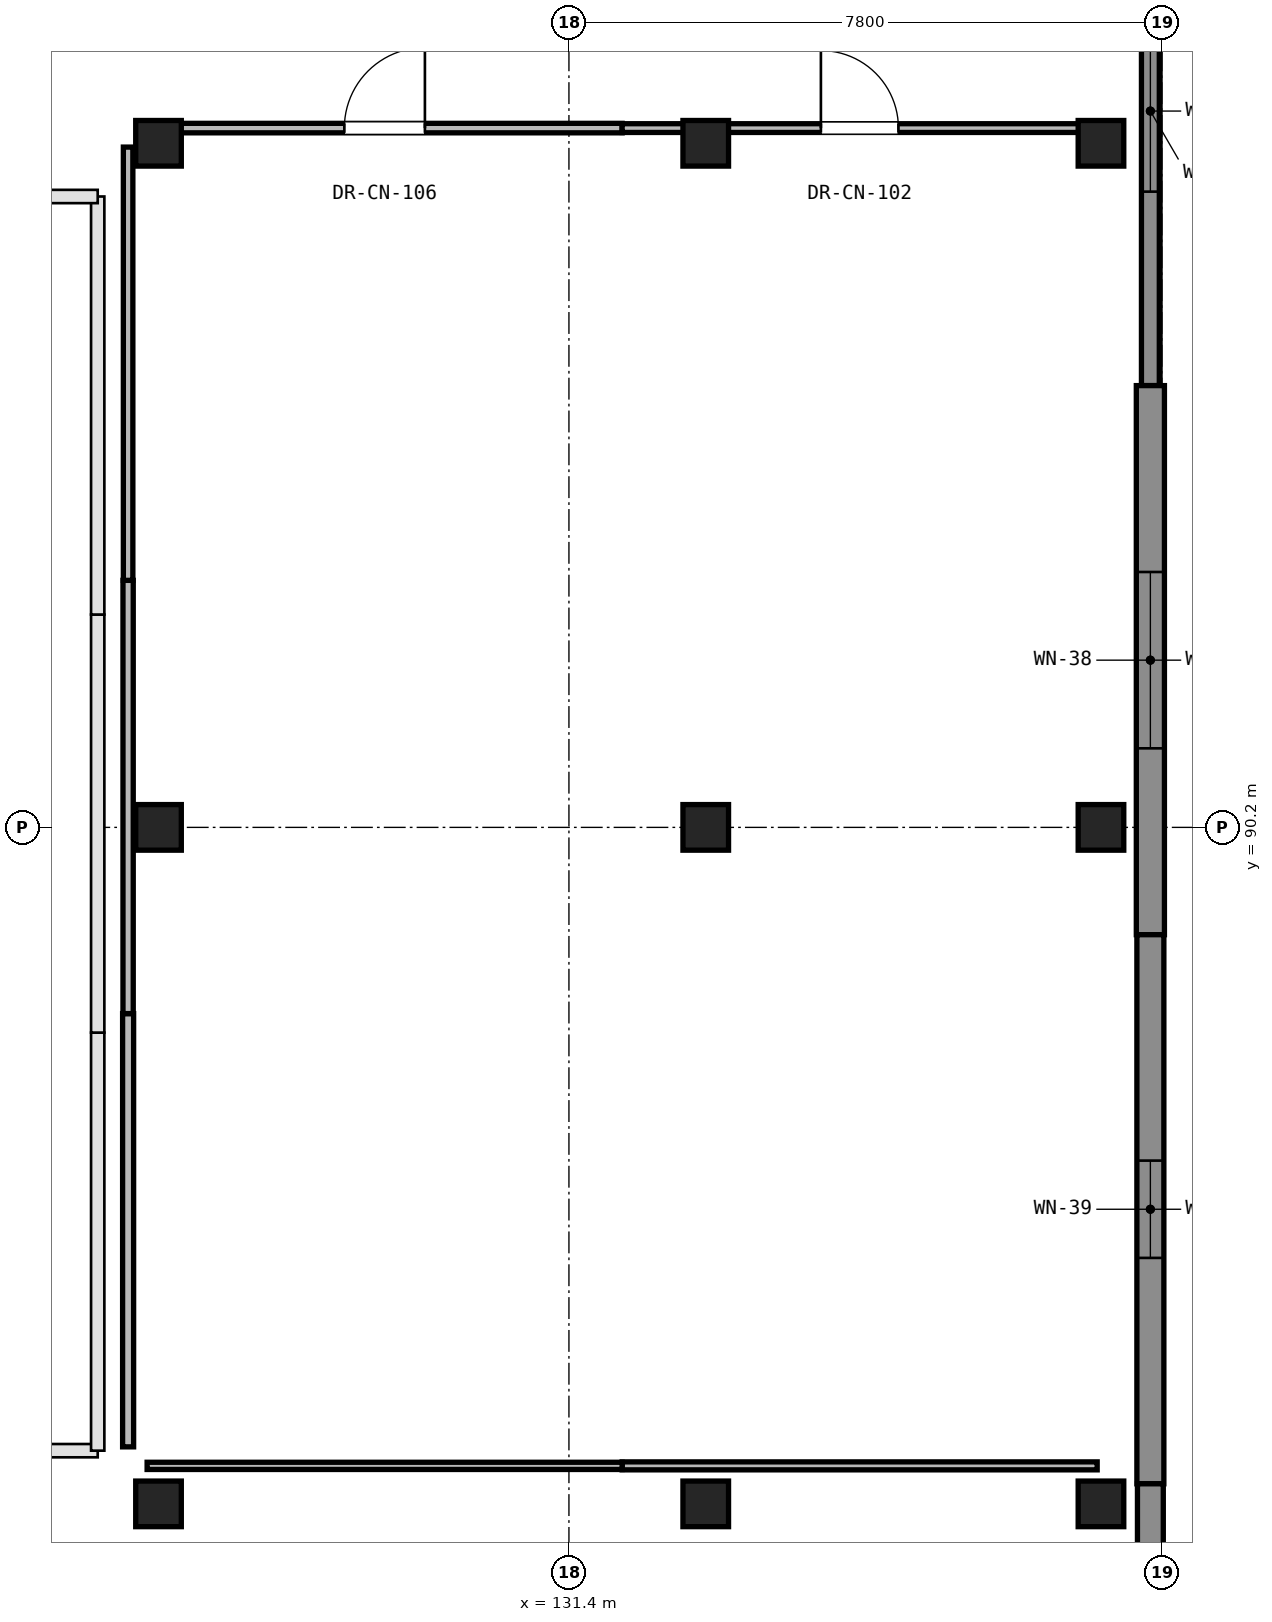
"""IFC4 building model, lengths in metres.
Left out: names, types, materials, properties, quantities, classifications, styles, units other than length and angle.
Written with IfcOpenShell. Run it as: python <this file> out.ifc"""

import sys

from ifc_helpers import new_model, si_unit, direction, frame, frame_2d, origin, origin_2d, place, context, subcontext, project, spatial, rectangle, extrude, element, fill, save


model = new_model("IFC4")
c1 = context("Model", 3, precision=1e-05, world=origin(), true_north=direction((0.0, 1.0)))
c2 = subcontext(c1, "Body", "Model", "MODEL_VIEW")
j1 = project(units=[si_unit("LENGTHUNIT", "METRE"), si_unit("PLANEANGLEUNIT", "RADIAN")], contexts=[c1])
p1 = place(None, origin())
s1 = spatial("IfcSite", under=j1, at=p1, CompositionType="ELEMENT")
p2 = place(p1, origin())
s2 = spatial("IfcBuilding", under=s1, at=p2, CompositionType="ELEMENT")
p3 = place(p2, origin())
s3 = spatial("IfcBuildingStorey", under=s2, at=p3, CompositionType="ELEMENT", Elevation=0.0)
for number, where, z_axis, x_axis in (
    (1, (126.0, 81.3, 0.0), (0.0, 0.0, 1.0), (1.0, 0.0, 0.0)),
    (2, (126.0, 90.2, 0.0), (0.0, 0.0, 1.0), (1.0, 0.0, 0.0)),
    (3, (126.0, 99.2, 0.0), (0.0, 0.0, 1.0), (1.0, 0.0, 0.0)),
    (4, (133.2, 81.3, 0.0), (0.0, 0.0, 1.0), (1.0, 0.0, 0.0)),
    (5, (133.2, 90.2, 0.0), (0.0, 0.0, 1.0), (1.0, 0.0, 0.0)),
    (6, (133.2, 99.2, 0.0), (0.0, 0.0, 1.0), (1.0, 0.0, 0.0)),
    (7, (138.4, 81.3, 0.0), (0.0, 0.0, 1.0), (1.0, 0.0, 0.0)),
    (8, (138.4, 90.2, 0.0), (0.0, 0.0, 1.0), (1.0, 0.0, 0.0)),
    (9, (138.4, 99.2, 0.0), (0.0, 0.0, 1.0), (1.0, 0.0, 0.0)),
):
    element("IfcColumn", number, at=place(p3, frame(where, z_axis=z_axis, x_axis=x_axis)), inside=s3, PredefinedType="COLUMN", context=c2, shape_type="SweptSolid", body=[
        extrude(rectangle(XDim=0.6, YDim=0.6, at=origin_2d()), origin(), (0.0, 0.0, 1.0), 5.1),
    ])
p4 = place(p3, frame((139.05, 103.236, 0.0), z_axis=(0.0, 0.0, 1.0), x_axis=(0.0, -1.0, 0.0)))
e10 = element("IfcWall", 10, at=p4, inside=s3, PredefinedType="SOLIDWALL", context=c2, shape_type="SweptSolid", body=[
    extrude(rectangle(XDim=7.224, YDim=0.235, at=frame_2d((3.612, 0.0))), origin(), (0.0, 0.0, 1.0), 4.81),
])
p5 = place(p4, frame((2.552, 0.0, 0.9)))
e11 = element("IfcOpeningElement", 11, at=p5, cuts=e10, PredefinedType="OPENING", context=c2, shape_type="SweptSolid", body=[
    extrude(rectangle(XDim=2.12, YDim=1.62, at=frame_2d((1.06, 0.81))), frame((0.0, 0.127, 0.0), z_axis=(0.0, -1.0, 0.0), x_axis=(1.0, 0.0, 0.0)), (0.0, 0.0, 1.0), 0.255),
])
p6 = place(p3, frame((139.05, 96.012, 0.0), z_axis=(0.0, 0.0, 1.0), x_axis=(0.0, -1.0, 0.0)))
e12 = element("IfcWall", 12, at=p6, inside=s3, PredefinedType="SOLIDWALL", context=c2, shape_type="SweptSolid", body=[
    extrude(rectangle(XDim=7.224, YDim=0.37, at=frame_2d((3.612, 0.0))), origin(), (0.0, 0.0, 1.0), 4.81),
])
p7 = place(p6, frame((2.452, 0.0, 0.9)))
e13 = element("IfcOpeningElement", 13, at=p7, cuts=e12, PredefinedType="OPENING", context=c2, shape_type="SweptSolid", body=[
    extrude(rectangle(XDim=2.32, YDim=1.62, at=frame_2d((1.16, 0.81))), frame((0.0, 0.195, 0.0), z_axis=(0.0, -1.0, 0.0), x_axis=(1.0, 0.0, 0.0)), (0.0, 0.0, 1.0), 0.39),
])
p8 = place(p3, frame((139.05, 88.788, 0.0), z_axis=(0.0, 0.0, 1.0), x_axis=(0.0, -1.0, 0.0)))
e14 = element("IfcWall", 14, at=p8, inside=s3, PredefinedType="SOLIDWALL", context=c2, shape_type="SweptSolid", body=[
    extrude(rectangle(XDim=7.224, YDim=0.355, at=frame_2d((3.612, 0.0))), origin(), (0.0, 0.0, 1.0), 4.81),
])
p9 = place(p8, frame((2.972, 0.0, 0.9)))
e15 = element("IfcOpeningElement", 15, at=p9, cuts=e14, PredefinedType="OPENING", context=c2, shape_type="SweptSolid", body=[
    extrude(rectangle(XDim=1.28, YDim=1.88, at=frame_2d((0.64, 0.94))), frame((0.0, 0.188, 0.0), z_axis=(0.0, -1.0, 0.0), x_axis=(1.0, 0.0, 0.0)), (0.0, 0.0, 1.0), 0.375),
])
p10 = place(p3, frame((139.05, 81.564, 0.0), z_axis=(0.0, 0.0, 1.0), x_axis=(0.0, -1.0, 0.0)))
e16 = element("IfcWall", 16, at=p10, inside=s3, PredefinedType="SOLIDWALL", context=c2, shape_type="SweptSolid", body=[
    extrude(rectangle(XDim=7.224, YDim=0.34, at=frame_2d((3.612, 0.0))), origin(), (0.0, 0.0, 1.0), 4.81),
])
p11 = place(p10, frame((2.772, 0.0, 0.9)))
e17 = element("IfcOpeningElement", 17, at=p11, cuts=e16, PredefinedType="OPENING", context=c2, shape_type="SweptSolid", body=[
    extrude(rectangle(XDim=1.68, YDim=1.88, at=frame_2d((0.84, 0.94))), frame((0.0, 0.18, 0.0), z_axis=(0.0, -1.0, 0.0), x_axis=(1.0, 0.0, 0.0)), (0.0, 0.0, 1.0), 0.36),
])
p12 = place(p3, frame((125.85, 99.4, 0.0), z_axis=(0.0, 0.0, 1.0), x_axis=(1.0, 0.0, 0.0)))
e18 = element("IfcWall", 18, at=p12, inside=s3, PredefinedType="PARTITIONING", context=c2, shape_type="SweptSolid", body=[
    extrude(rectangle(XDim=6.25, YDim=0.125, at=frame_2d((3.125, 0.0))), origin(), (0.0, 0.0, 1.0), 4.01),
])
p13 = place(p12, frame((2.595, 0.0, 0.0)))
e19 = element("IfcOpeningElement", 19, at=p13, cuts=e18, PredefinedType="OPENING", context=c2, shape_type="SweptSolid", body=[
    extrude(rectangle(XDim=1.06, YDim=2.15, at=frame_2d((0.53, 1.075))), frame((0.0, 0.073, 0.0), z_axis=(0.0, -1.0, 0.0), x_axis=(1.0, 0.0, 0.0)), (0.0, 0.0, 1.0), 0.145),
])
p14 = place(p3, frame((132.1, 99.4, 0.0), z_axis=(0.0, 0.0, 1.0), x_axis=(1.0, 0.0, 0.0)))
e20 = element("IfcWall", 20, at=p14, inside=s3, PredefinedType="PARTITIONING", context=c2, shape_type="SweptSolid", body=[
    extrude(rectangle(XDim=6.25, YDim=0.115, at=frame_2d((3.125, 0.0))), origin(), (0.0, 0.0, 1.0), 4.11),
])
p15 = place(p14, frame((2.615, 0.0, 0.0)))
e21 = element("IfcOpeningElement", 21, at=p15, cuts=e20, PredefinedType="OPENING", context=c2, shape_type="SweptSolid", body=[
    extrude(rectangle(XDim=1.02, YDim=2.15, at=frame_2d((0.51, 1.075))), frame((0.0, 0.067, 0.0), z_axis=(0.0, -1.0, 0.0), x_axis=(1.0, 0.0, 0.0)), (0.0, 0.0, 1.0), 0.135),
])
p16 = place(p3, frame((138.35, 81.8, 0.0), z_axis=(0.0, 0.0, 1.0), x_axis=(-1.0, 0.0, 0.0)))
e22 = element("IfcWall", 22, at=p16, inside=s3, PredefinedType="PARTITIONING", context=c2, shape_type="SweptSolid", body=[
    extrude(rectangle(XDim=6.25, YDim=0.105, at=frame_2d((3.125, 0.0))), origin(), (0.0, 0.0, 1.0), 4.01),
])
p17 = place(p3, frame((132.1, 81.8, 0.0), z_axis=(0.0, 0.0, 1.0), x_axis=(-1.0, 0.0, 0.0)))
e23 = element("IfcWall", 23, at=p17, inside=s3, PredefinedType="PARTITIONING", context=c2, shape_type="SweptSolid", body=[
    extrude(rectangle(XDim=6.25, YDim=0.095, at=frame_2d((3.125, 0.0))), origin(), (0.0, 0.0, 1.0), 4.06),
])
p18 = place(p3, frame((125.6, 82.05, 0.0), z_axis=(0.0, 0.0, 1.0), x_axis=(0.0, 1.0, 0.0)))
e24 = element("IfcWall", 24, at=p18, inside=s3, PredefinedType="PARTITIONING", context=c2, shape_type="SweptSolid", body=[
    extrude(rectangle(XDim=5.7, YDim=0.145, at=frame_2d((2.85, 0.0))), origin(), (0.0, 0.0, 1.0), 4.81),
])
p19 = place(p3, frame((125.6, 87.75, 0.0), z_axis=(0.0, 0.0, 1.0), x_axis=(0.0, 1.0, 0.0)))
e25 = element("IfcWall", 25, at=p19, inside=s3, PredefinedType="PARTITIONING", context=c2, shape_type="SweptSolid", body=[
    extrude(rectangle(XDim=5.7, YDim=0.135, at=frame_2d((2.85, 0.0))), origin(), (0.0, 0.0, 1.0), 4.16),
])
p20 = place(p3, frame((125.6, 93.45, 0.0), z_axis=(0.0, 0.0, 1.0), x_axis=(0.0, 1.0, 0.0)))
e26 = element("IfcWall", 26, at=p20, inside=s3, PredefinedType="PARTITIONING", context=c2, shape_type="SweptSolid", body=[
    extrude(rectangle(XDim=5.7, YDim=0.125, at=frame_2d((2.85, 0.0))), origin(), (0.0, 0.0, 1.0), 4.01),
])
p21 = place(p5, origin())
e27 = element("IfcWindow", 27, at=p21, inside=s3, PartitioningType="SINGLE_PANEL", PredefinedType="WINDOW", context=c2, shape_type="SweptSolid", body=[
    extrude(rectangle(XDim=2.12, YDim=1.62, at=frame_2d((1.06, 0.81))), frame((0.0, 0.03, 0.0), z_axis=(0.0, -1.0, 0.0), x_axis=(1.0, 0.0, 0.0)), (0.0, 0.0, 1.0), 0.06),
])
fill(e11, e27)
p22 = place(p7, origin())
e28 = element("IfcWindow", 28, at=p22, inside=s3, PartitioningType="SINGLE_PANEL", PredefinedType="WINDOW", context=c2, shape_type="SweptSolid", body=[
    extrude(rectangle(XDim=2.32, YDim=1.62, at=frame_2d((1.16, 0.81))), frame((0.0, 0.03, 0.0), z_axis=(0.0, -1.0, 0.0), x_axis=(1.0, 0.0, 0.0)), (0.0, 0.0, 1.0), 0.06),
])
fill(e13, e28)
p23 = place(p9, origin())
e29 = element("IfcWindow", 29, at=p23, inside=s3, PartitioningType="SINGLE_PANEL", PredefinedType="WINDOW", context=c2, shape_type="SweptSolid", body=[
    extrude(rectangle(XDim=1.28, YDim=1.88, at=frame_2d((0.64, 0.94))), frame((0.0, 0.03, 0.0), z_axis=(0.0, -1.0, 0.0), x_axis=(1.0, 0.0, 0.0)), (0.0, 0.0, 1.0), 0.06),
])
fill(e15, e29)
p24 = place(p13, origin())
e30 = element("IfcDoor", 30, at=p24, inside=s3, OperationType="SINGLE_SWING_RIGHT", PredefinedType="DOOR", context=c2, shape_type="SweptSolid", body=[
    extrude(rectangle(XDim=1.06, YDim=2.15, at=frame_2d((0.53, 1.075))), frame((0.0, 0.025, 0.0), z_axis=(0.0, -1.0, 0.0), x_axis=(1.0, 0.0, 0.0)), (0.0, 0.0, 1.0), 0.05),
])
fill(e19, e30)
p25 = place(p15, origin())
e31 = element("IfcDoor", 31, at=p25, inside=s3, OperationType="SINGLE_SWING_LEFT", PredefinedType="DOOR", context=c2, shape_type="SweptSolid", body=[
    extrude(rectangle(XDim=1.02, YDim=2.15, at=frame_2d((0.51, 1.075))), frame((0.0, 0.025, 0.0), z_axis=(0.0, -1.0, 0.0), x_axis=(1.0, 0.0, 0.0)), (0.0, 0.0, 1.0), 0.05),
])
fill(e21, e31)
save(model, sys.argv[1])
